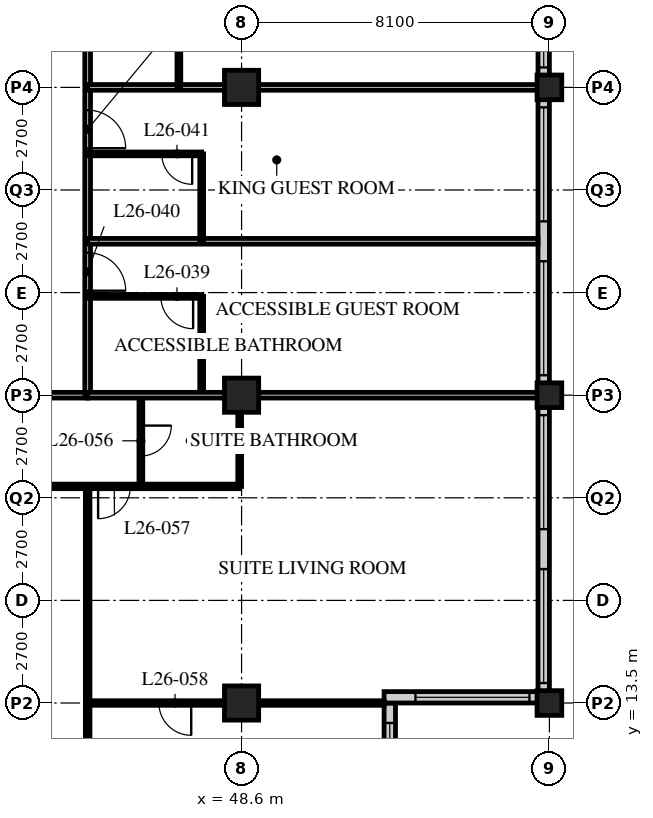
"""IFC4 building model, lengths in metres.
Left out: names, types, materials, properties, quantities, classifications, styles, units other than length and angle.
Written with IfcOpenShell. Run it as: python <this file> out.ifc"""

import sys

from ifc_helpers import new_model, si_unit, direction, frame, frame_2d, origin, origin_2d, place, context, subcontext, project, spatial, rectangle, hollow_rectangle, extrude, element, fill, save


model = new_model("IFC4")
c1 = context("Model", 3, precision=1e-05, world=origin(), true_north=direction((0.0, 1.0)))
c2 = subcontext(c1, "Body", "Model", "MODEL_VIEW")
j1 = project(units=[si_unit("LENGTHUNIT", "METRE"), si_unit("PLANEANGLEUNIT", "RADIAN")], contexts=[c1])
p1 = place(None, origin())
s1 = spatial("IfcSite", under=j1, at=p1, CompositionType="ELEMENT")
p2 = place(p1, origin())
s2 = spatial("IfcBuilding", under=s1, at=p2, CompositionType="ELEMENT")
p3 = place(p2, frame((0.0, 0.0, 106.8)))
s3 = spatial("IfcBuildingStorey", under=s2, at=p3, CompositionType="ELEMENT", Elevation=106.8)
for number, where, z_axis, x_axis in (
    (1, (48.6, 13.5, 0.0), (0.0, 0.0, 1.0), (1.0, 0.0, 0.0)),
    (2, (48.6, 21.6, 0.0), (0.0, 0.0, 1.0), (1.0, 0.0, 0.0)),
    (3, (48.6, 29.7, 0.0), (0.0, 0.0, 1.0), (1.0, 0.0, 0.0)),
):
    element("IfcColumn", number, at=place(p3, frame(where, z_axis=z_axis, x_axis=x_axis)), inside=s3, PredefinedType="COLUMN", context=c2, shape_type="SweptSolid", body=[
        extrude(hollow_rectangle(XDim=0.9, YDim=0.9, WallThickness=0.09, at=origin_2d()), origin(), (0.0, 0.0, 1.0), 3.4),
    ])
for number, where, z_axis, x_axis in (
    (4, (56.7, 13.5, 0.0), (0.0, 0.0, 1.0), (1.0, 0.0, 0.0)),
    (5, (56.7, 21.6, 0.0), (0.0, 0.0, 1.0), (1.0, 0.0, 0.0)),
    (6, (56.7, 29.7, 0.0), (0.0, 0.0, 1.0), (1.0, 0.0, 0.0)),
):
    element("IfcColumn", number, at=place(p3, frame(where, z_axis=z_axis, x_axis=x_axis)), inside=s3, PredefinedType="COLUMN", context=c2, shape_type="SweptSolid", body=[
        extrude(hollow_rectangle(XDim=0.65, YDim=0.65, WallThickness=0.055, at=origin_2d()), origin(), (0.0, 0.0, 1.0), 3.4),
    ])
p4 = place(p3, frame((52.5, 9.75, 0.0), z_axis=(0.0, 0.0, 1.0), x_axis=(0.0, 1.0, 0.0)))
e7 = element("IfcWall", 7, at=p4, inside=s3, PredefinedType="SOLIDWALL", context=c2, shape_type="SweptSolid", body=[
    extrude(rectangle(XDim=3.75, YDim=0.3, at=frame_2d((1.875, 0.0))), origin(), (0.0, 0.0, 1.0), 3.19),
])
p5 = place(p4, frame((0.225, 0.0, 0.9)))
e8 = element("IfcOpeningElement", 8, at=p5, cuts=e7, PredefinedType="OPENING", context=c2, shape_type="SweptSolid", body=[
    extrude(rectangle(XDim=3.0, YDim=1.5, at=frame_2d((1.5, 0.75))), frame((0.0, 0.16, 0.0), z_axis=(0.0, -1.0, 0.0), x_axis=(1.0, 0.0, 0.0)), (0.0, 0.0, 1.0), 0.32),
])
p6 = place(p3, frame((52.35, 13.65, 0.0), z_axis=(0.0, 0.0, 1.0), x_axis=(1.0, 0.0, 0.0)))
e9 = element("IfcWall", 9, at=p6, inside=s3, PredefinedType="SOLIDWALL", context=c2, shape_type="SweptSolid", body=[
    extrude(rectangle(XDim=4.35, YDim=0.3, at=frame_2d((2.175, 0.0))), origin(), (0.0, 0.0, 1.0), 3.19),
])
p7 = place(p6, frame((0.825, 0.0, 0.9)))
e10 = element("IfcOpeningElement", 10, at=p7, cuts=e9, PredefinedType="OPENING", context=c2, shape_type="SweptSolid", body=[
    extrude(rectangle(XDim=3.0, YDim=1.5, at=frame_2d((1.5, 0.75))), frame((0.0, 0.16, 0.0), z_axis=(0.0, -1.0, 0.0), x_axis=(1.0, 0.0, 0.0)), (0.0, 0.0, 1.0), 0.32),
])
p8 = place(p3, frame((56.55, 13.8, 0.0), z_axis=(0.0, 0.0, 1.0), x_axis=(0.0, 1.0, 0.0)))
e11 = element("IfcWall", 11, at=p8, inside=s3, PredefinedType="SOLIDWALL", context=c2, shape_type="SweptSolid", body=[
    extrude(rectangle(XDim=32.1, YDim=0.3, at=frame_2d((16.05, 0.0))), origin(), (0.0, 0.0, 1.0), 3.19),
])
p9 = place(p8, frame((0.225, 0.0, 0.9)))
e12 = element("IfcOpeningElement", 12, at=p9, cuts=e11, PredefinedType="OPENING", context=c2, shape_type="SweptSolid", body=[
    extrude(rectangle(XDim=3.0, YDim=2.0, at=frame_2d((1.5, 1.0))), frame((0.0, 0.16, 0.0), z_axis=(0.0, -1.0, 0.0), x_axis=(1.0, 0.0, 0.0)), (0.0, 0.0, 1.0), 0.32),
])
p10 = place(p8, frame((4.275, 0.0, 0.9)))
e13 = element("IfcOpeningElement", 13, at=p10, cuts=e11, PredefinedType="OPENING", context=c2, shape_type="SweptSolid", body=[
    extrude(rectangle(XDim=3.0, YDim=2.0, at=frame_2d((1.5, 1.0))), frame((0.0, 0.16, 0.0), z_axis=(0.0, -1.0, 0.0), x_axis=(1.0, 0.0, 0.0)), (0.0, 0.0, 1.0), 0.32),
])
p11 = place(p8, frame((8.325, 0.0, 0.9)))
e14 = element("IfcOpeningElement", 14, at=p11, cuts=e11, PredefinedType="OPENING", context=c2, shape_type="SweptSolid", body=[
    extrude(rectangle(XDim=3.0, YDim=2.0, at=frame_2d((1.5, 1.0))), frame((0.0, 0.16, 0.0), z_axis=(0.0, -1.0, 0.0), x_axis=(1.0, 0.0, 0.0)), (0.0, 0.0, 1.0), 0.32),
])
p12 = place(p8, frame((12.375, 0.0, 0.9)))
e15 = element("IfcOpeningElement", 15, at=p12, cuts=e11, PredefinedType="OPENING", context=c2, shape_type="SweptSolid", body=[
    extrude(rectangle(XDim=3.0, YDim=2.0, at=frame_2d((1.5, 1.0))), frame((0.0, 0.16, 0.0), z_axis=(0.0, -1.0, 0.0), x_axis=(1.0, 0.0, 0.0)), (0.0, 0.0, 1.0), 0.32),
])
p13 = place(p8, frame((16.425, 0.0, 0.9)))
e16 = element("IfcOpeningElement", 16, at=p13, cuts=e11, PredefinedType="OPENING", context=c2, shape_type="SweptSolid", body=[
    extrude(rectangle(XDim=3.0, YDim=2.0, at=frame_2d((1.5, 1.0))), frame((0.0, 0.16, 0.0), z_axis=(0.0, -1.0, 0.0), x_axis=(1.0, 0.0, 0.0)), (0.0, 0.0, 1.0), 0.32),
])
p14 = place(p8, frame((20.475, 0.0, 0.9)))
e17 = element("IfcOpeningElement", 17, at=p14, cuts=e11, PredefinedType="OPENING", context=c2, shape_type="SweptSolid", body=[
    extrude(rectangle(XDim=3.0, YDim=2.0, at=frame_2d((1.5, 1.0))), frame((0.0, 0.16, 0.0), z_axis=(0.0, -1.0, 0.0), x_axis=(1.0, 0.0, 0.0)), (0.0, 0.0, 1.0), 0.32),
])
p15 = place(p8, frame((24.525, 0.0, 0.9)))
e18 = element("IfcOpeningElement", 18, at=p15, cuts=e11, PredefinedType="OPENING", context=c2, shape_type="SweptSolid", body=[
    extrude(rectangle(XDim=3.0, YDim=2.0, at=frame_2d((1.5, 1.0))), frame((0.0, 0.16, 0.0), z_axis=(0.0, -1.0, 0.0), x_axis=(1.0, 0.0, 0.0)), (0.0, 0.0, 1.0), 0.32),
])
p16 = place(p8, frame((28.575, 0.0, 0.9)))
e19 = element("IfcOpeningElement", 19, at=p16, cuts=e11, PredefinedType="OPENING", context=c2, shape_type="SweptSolid", body=[
    extrude(rectangle(XDim=3.0, YDim=2.0, at=frame_2d((1.5, 1.0))), frame((0.0, 0.16, 0.0), z_axis=(0.0, -1.0, 0.0), x_axis=(1.0, 0.0, 0.0)), (0.0, 0.0, 1.0), 0.32),
])
p17 = place(p3, frame((12.15, 21.6, 0.0), z_axis=(0.0, 0.0, 1.0), x_axis=(1.0, 0.0, 0.0)))
e20 = element("IfcWall", 20, at=p17, inside=s3, PredefinedType="PARTITIONING", context=c2, shape_type="SweptSolid", body=[
    extrude(rectangle(XDim=32.4, YDim=0.15, at=frame_2d((16.2, 0.0))), origin(), (0.0, 0.0, 1.0), 2.578),
])
p18 = place(p17, frame((5.95, 0.0, 0.0)))
e21 = element("IfcOpeningElement", 21, at=p18, cuts=e20, PredefinedType="OPENING", context=c2, shape_type="SweptSolid", body=[
    extrude(rectangle(XDim=1.0, YDim=2.1, at=frame_2d((0.5, 1.05))), frame((0.0, 0.085, 0.0), z_axis=(0.0, -1.0, 0.0), x_axis=(1.0, 0.0, 0.0)), (0.0, 0.0, 1.0), 0.17),
])
p19 = place(p17, frame((14.05, 0.0, 0.0)))
e22 = element("IfcOpeningElement", 22, at=p19, cuts=e20, PredefinedType="OPENING", context=c2, shape_type="SweptSolid", body=[
    extrude(rectangle(XDim=1.0, YDim=2.1, at=frame_2d((0.5, 1.05))), frame((0.0, 0.085, 0.0), z_axis=(0.0, -1.0, 0.0), x_axis=(1.0, 0.0, 0.0)), (0.0, 0.0, 1.0), 0.17),
])
p20 = place(p17, frame((22.15, 0.0, 0.0)))
e23 = element("IfcOpeningElement", 23, at=p20, cuts=e20, PredefinedType="OPENING", context=c2, shape_type="SweptSolid", body=[
    extrude(rectangle(XDim=1.0, YDim=2.1, at=frame_2d((0.5, 1.05))), frame((0.0, 0.085, 0.0), z_axis=(0.0, -1.0, 0.0), x_axis=(1.0, 0.0, 0.0)), (0.0, 0.0, 1.0), 0.17),
])
p21 = place(p17, frame((1.525, 0.0, 0.0)))
e24 = element("IfcOpeningElement", 24, at=p21, cuts=e20, PredefinedType="OPENING", context=c2, shape_type="SweptSolid", body=[
    extrude(rectangle(XDim=1.0, YDim=2.1, at=frame_2d((0.5, 1.05))), frame((0.0, 0.085, 0.0), z_axis=(0.0, -1.0, 0.0), x_axis=(1.0, 0.0, 0.0)), (0.0, 0.0, 1.0), 0.17),
])
p22 = place(p17, frame((29.875, 0.0, 0.0)))
e25 = element("IfcOpeningElement", 25, at=p22, cuts=e20, PredefinedType="OPENING", context=c2, shape_type="SweptSolid", body=[
    extrude(rectangle(XDim=1.0, YDim=2.1, at=frame_2d((0.5, 1.05))), frame((0.0, 0.085, 0.0), z_axis=(0.0, -1.0, 0.0), x_axis=(1.0, 0.0, 0.0)), (0.0, 0.0, 1.0), 0.17),
])
p23 = place(p3, frame((44.55, 21.6, 0.0), z_axis=(0.0, 0.0, 1.0), x_axis=(0.0, 1.0, 0.0)))
e26 = element("IfcWall", 26, at=p23, inside=s3, PredefinedType="PARTITIONING", context=c2, shape_type="SweptSolid", body=[
    extrude(rectangle(XDim=24.3, YDim=0.15, at=frame_2d((12.15, 0.0))), origin(), (0.0, 0.0, 1.0), 3.19),
])
p24 = place(p23, frame((2.75, 0.0, 0.0)))
e27 = element("IfcOpeningElement", 27, at=p24, cuts=e26, PredefinedType="OPENING", context=c2, shape_type="SweptSolid", body=[
    extrude(rectangle(XDim=1.0, YDim=2.1, at=frame_2d((0.5, 1.05))), frame((0.0, 0.085, 0.0), z_axis=(0.0, -1.0, 0.0), x_axis=(1.0, 0.0, 0.0)), (0.0, 0.0, 1.0), 0.17),
])
p25 = place(p23, frame((6.5, 0.0, 0.0)))
e28 = element("IfcOpeningElement", 28, at=p25, cuts=e26, PredefinedType="OPENING", context=c2, shape_type="SweptSolid", body=[
    extrude(rectangle(XDim=1.0, YDim=2.1, at=frame_2d((0.5, 1.05))), frame((0.0, 0.085, 0.0), z_axis=(0.0, -1.0, 0.0), x_axis=(1.0, 0.0, 0.0)), (0.0, 0.0, 1.0), 0.17),
])
p26 = place(p23, frame((13.55, 0.0, 0.0)))
e29 = element("IfcOpeningElement", 29, at=p26, cuts=e26, PredefinedType="OPENING", context=c2, shape_type="SweptSolid", body=[
    extrude(rectangle(XDim=1.0, YDim=2.1, at=frame_2d((0.5, 1.05))), frame((0.0, 0.085, 0.0), z_axis=(0.0, -1.0, 0.0), x_axis=(1.0, 0.0, 0.0)), (0.0, 0.0, 1.0), 0.17),
])
p27 = place(p23, frame((21.65, 0.0, 0.0)))
e30 = element("IfcOpeningElement", 30, at=p27, cuts=e26, PredefinedType="OPENING", context=c2, shape_type="SweptSolid", body=[
    extrude(rectangle(XDim=1.0, YDim=2.1, at=frame_2d((0.5, 1.05))), frame((0.0, 0.085, 0.0), z_axis=(0.0, -1.0, 0.0), x_axis=(1.0, 0.0, 0.0)), (0.0, 0.0, 1.0), 0.17),
])
p28 = place(p3, frame((47.55, 21.6, 0.0), z_axis=(0.0, 0.0, 1.0), x_axis=(0.0, 1.0, 0.0)))
e31 = element("IfcWall", 31, at=p28, inside=s3, PredefinedType="PARTITIONING", context=c2, shape_type="SweptSolid", body=[
    extrude(rectangle(XDim=2.6, YDim=0.1, at=frame_2d((1.3, 0.0))), origin(), (0.0, 0.0, 1.0), 3.19),
])
p29 = place(p3, frame((44.55, 24.2, 0.0), z_axis=(0.0, 0.0, 1.0), x_axis=(1.0, 0.0, 0.0)))
e32 = element("IfcWall", 32, at=p29, inside=s3, PredefinedType="PARTITIONING", context=c2, shape_type="SweptSolid", body=[
    extrude(rectangle(XDim=3.0, YDim=0.1, at=frame_2d((1.5, 0.0))), origin(), (0.0, 0.0, 1.0), 3.19),
])
p30 = place(p29, frame((1.925, 0.0, 0.0)))
e33 = element("IfcOpeningElement", 33, at=p30, cuts=e32, PredefinedType="OPENING", context=c2, shape_type="SweptSolid", body=[
    extrude(rectangle(XDim=0.85, YDim=2.1, at=frame_2d((0.425, 1.05))), frame((0.0, 0.06, 0.0), z_axis=(0.0, -1.0, 0.0), x_axis=(1.0, 0.0, 0.0)), (0.0, 0.0, 1.0), 0.12),
])
p31 = place(p3, frame((44.55, 25.65, 0.0), z_axis=(0.0, 0.0, 1.0), x_axis=(1.0, 0.0, 0.0)))
e34 = element("IfcWall", 34, at=p31, inside=s3, PredefinedType="PARTITIONING", context=c2, shape_type="SweptSolid", body=[
    extrude(rectangle(XDim=11.85, YDim=0.15, at=frame_2d((5.925, 0.0))), origin(), (0.0, 0.0, 1.0), 3.19),
])
p32 = place(p3, frame((47.55, 25.65, 0.0), z_axis=(0.0, 0.0, 1.0), x_axis=(0.0, 1.0, 0.0)))
e35 = element("IfcWall", 35, at=p32, inside=s3, PredefinedType="PARTITIONING", context=c2, shape_type="SweptSolid", body=[
    extrude(rectangle(XDim=2.3, YDim=0.1, at=frame_2d((1.15, 0.0))), origin(), (0.0, 0.0, 1.0), 3.19),
])
p33 = place(p3, frame((44.55, 27.95, 0.0), z_axis=(0.0, 0.0, 1.0), x_axis=(1.0, 0.0, 0.0)))
e36 = element("IfcWall", 36, at=p33, inside=s3, PredefinedType="PARTITIONING", context=c2, shape_type="SweptSolid", body=[
    extrude(rectangle(XDim=3.0, YDim=0.1, at=frame_2d((1.5, 0.0))), origin(), (0.0, 0.0, 1.0), 3.19),
])
p34 = place(p33, frame((1.95, 0.0, 0.0)))
e37 = element("IfcOpeningElement", 37, at=p34, cuts=e36, PredefinedType="OPENING", context=c2, shape_type="SweptSolid", body=[
    extrude(rectangle(XDim=0.8, YDim=2.1, at=frame_2d((0.4, 1.05))), frame((0.0, 0.06, 0.0), z_axis=(0.0, -1.0, 0.0), x_axis=(1.0, 0.0, 0.0)), (0.0, 0.0, 1.0), 0.12),
])
p35 = place(p3, frame((44.55, 29.7, 0.0), z_axis=(0.0, 0.0, 1.0), x_axis=(1.0, 0.0, 0.0)))
e38 = element("IfcWall", 38, at=p35, inside=s3, PredefinedType="PARTITIONING", context=c2, shape_type="SweptSolid", body=[
    extrude(rectangle(XDim=11.85, YDim=0.15, at=frame_2d((5.925, 0.0))), origin(), (0.0, 0.0, 1.0), 2.578),
])
p36 = place(p3, frame((46.95, 29.7, 0.0), z_axis=(0.0, 0.0, 1.0), x_axis=(0.0, 1.0, 0.0)))
e39 = element("IfcWall", 39, at=p36, inside=s3, PredefinedType="PARTITIONING", context=c2, shape_type="SweptSolid", body=[
    extrude(rectangle(XDim=5.2, YDim=0.1, at=frame_2d((2.6, 0.0))), origin(), (0.0, 0.0, 1.0), 3.19),
])
p37 = place(p36, frame((1.3, 0.0, 0.0)))
e40 = element("IfcOpeningElement", 40, at=p37, cuts=e39, PredefinedType="OPENING", context=c2, shape_type="SweptSolid", body=[
    extrude(rectangle(XDim=0.8, YDim=2.1, at=frame_2d((0.4, 1.05))), frame((0.0, 0.06, 0.0), z_axis=(0.0, -1.0, 0.0), x_axis=(1.0, 0.0, 0.0)), (0.0, 0.0, 1.0), 0.12),
])
p38 = place(p36, frame((3.9, 0.0, 0.0)))
e41 = element("IfcOpeningElement", 41, at=p38, cuts=e39, PredefinedType="OPENING", context=c2, shape_type="SweptSolid", body=[
    extrude(rectangle(XDim=0.8, YDim=2.1, at=frame_2d((0.4, 1.05))), frame((0.0, 0.06, 0.0), z_axis=(0.0, -1.0, 0.0), x_axis=(1.0, 0.0, 0.0)), (0.0, 0.0, 1.0), 0.12),
])
p39 = place(p3, frame((40.5, 19.2, 0.0), z_axis=(0.0, 0.0, 1.0), x_axis=(1.0, 0.0, 0.0)))
e42 = element("IfcWall", 42, at=p39, inside=s3, PredefinedType="PARTITIONING", context=c2, shape_type="SweptSolid", body=[
    extrude(rectangle(XDim=8.05, YDim=0.12, at=frame_2d((4.025, 0.0))), origin(), (0.0, 0.0, 1.0), 3.19),
])
p40 = place(p39, frame((0.475, 0.0, 0.0)))
e43 = element("IfcOpeningElement", 43, at=p40, cuts=e42, PredefinedType="OPENING", context=c2, shape_type="SweptSolid", body=[
    extrude(rectangle(XDim=0.85, YDim=2.1, at=frame_2d((0.425, 1.05))), frame((0.0, 0.07, 0.0), z_axis=(0.0, -1.0, 0.0), x_axis=(1.0, 0.0, 0.0)), (0.0, 0.0, 1.0), 0.14),
])
p41 = place(p39, frame((4.325, 0.0, 0.0)))
e44 = element("IfcOpeningElement", 44, at=p41, cuts=e42, PredefinedType="OPENING", context=c2, shape_type="SweptSolid", body=[
    extrude(rectangle(XDim=0.85, YDim=2.1, at=frame_2d((0.425, 1.05))), frame((0.0, 0.07, 0.0), z_axis=(0.0, -1.0, 0.0), x_axis=(1.0, 0.0, 0.0)), (0.0, 0.0, 1.0), 0.14),
])
p42 = place(p3, frame((45.95, 21.6, 0.0), z_axis=(0.0, 0.0, 1.0), x_axis=(0.0, -1.0, 0.0)))
e45 = element("IfcWall", 45, at=p42, inside=s3, PredefinedType="PARTITIONING", context=c2, shape_type="SweptSolid", body=[
    extrude(rectangle(XDim=2.4, YDim=0.1, at=frame_2d((1.2, 0.0))), origin(), (0.0, 0.0, 1.0), 3.19),
])
p43 = place(p42, frame((0.8, 0.0, 0.0)))
e46 = element("IfcOpeningElement", 46, at=p43, cuts=e45, PredefinedType="OPENING", context=c2, shape_type="SweptSolid", body=[
    extrude(rectangle(XDim=0.8, YDim=2.1, at=frame_2d((0.4, 1.05))), frame((0.0, 0.06, 0.0), z_axis=(0.0, -1.0, 0.0), x_axis=(1.0, 0.0, 0.0)), (0.0, 0.0, 1.0), 0.12),
])
p44 = place(p3, frame((48.55, 21.6, 0.0), z_axis=(0.0, 0.0, 1.0), x_axis=(0.0, -1.0, 0.0)))
e47 = element("IfcWall", 47, at=p44, inside=s3, PredefinedType="PARTITIONING", context=c2, shape_type="SweptSolid", body=[
    extrude(rectangle(XDim=2.4, YDim=0.1, at=frame_2d((1.2, 0.0))), origin(), (0.0, 0.0, 1.0), 2.578),
])
p45 = place(p3, frame((44.55, 19.2, 0.0), z_axis=(0.0, 0.0, 1.0), x_axis=(0.0, -1.0, 0.0)))
e48 = element("IfcWall", 48, at=p45, inside=s3, PredefinedType="PARTITIONING", context=c2, shape_type="SweptSolid", body=[
    extrude(rectangle(XDim=13.5, YDim=0.12, at=frame_2d((6.75, 0.0))), origin(), (0.0, 0.0, 1.0), 3.19),
])
p46 = place(p3, frame((44.55, 13.5, 0.0), z_axis=(0.0, 0.0, 1.0), x_axis=(1.0, 0.0, 0.0)))
e49 = element("IfcWall", 49, at=p46, inside=s3, PredefinedType="PARTITIONING", context=c2, shape_type="SweptSolid", body=[
    extrude(rectangle(XDim=7.8, YDim=0.12, at=frame_2d((3.9, 0.0))), origin(), (0.0, 0.0, 1.0), 2.578),
])
p47 = place(p46, frame((1.875, 0.0, 0.0)))
e50 = element("IfcOpeningElement", 50, at=p47, cuts=e49, PredefinedType="OPENING", context=c2, shape_type="SweptSolid", body=[
    extrude(rectangle(XDim=0.85, YDim=2.1, at=frame_2d((0.425, 1.05))), frame((0.0, 0.07, 0.0), z_axis=(0.0, -1.0, 0.0), x_axis=(1.0, 0.0, 0.0)), (0.0, 0.0, 1.0), 0.14),
])
p48 = place(p3, frame((44.55, 21.6, 0.0), z_axis=(0.0, 0.0, 1.0), x_axis=(1.0, 0.0, 0.0)))
e51 = element("IfcWall", 51, at=p48, inside=s3, PredefinedType="PARTITIONING", context=c2, shape_type="SweptSolid", body=[
    extrude(rectangle(XDim=11.85, YDim=0.15, at=frame_2d((5.925, 0.0))), origin(), (0.0, 0.0, 1.0), 2.578),
])
p49 = place(p5, origin())
e52 = element("IfcWindow", 52, at=p49, inside=s3, PartitioningType="SINGLE_PANEL", PredefinedType="WINDOW", context=c2, shape_type="SweptSolid", body=[
    extrude(rectangle(XDim=3.0, YDim=1.5, at=frame_2d((1.5, 0.75))), frame((0.0, 0.03, 0.0), z_axis=(0.0, -1.0, 0.0), x_axis=(1.0, 0.0, 0.0)), (0.0, 0.0, 1.0), 0.06),
])
fill(e8, e52)
p50 = place(p7, origin())
e53 = element("IfcWindow", 53, at=p50, inside=s3, PartitioningType="SINGLE_PANEL", PredefinedType="WINDOW", context=c2, shape_type="SweptSolid", body=[
    extrude(rectangle(XDim=3.0, YDim=1.5, at=frame_2d((1.5, 0.75))), frame((0.0, 0.03, 0.0), z_axis=(0.0, -1.0, 0.0), x_axis=(1.0, 0.0, 0.0)), (0.0, 0.0, 1.0), 0.06),
])
fill(e10, e53)
p51 = place(p9, origin())
e54 = element("IfcWindow", 54, at=p51, inside=s3, PartitioningType="SINGLE_PANEL", PredefinedType="WINDOW", context=c2, shape_type="SweptSolid", body=[
    extrude(rectangle(XDim=3.0, YDim=2.0, at=frame_2d((1.5, 1.0))), frame((0.0, 0.03, 0.0), z_axis=(0.0, -1.0, 0.0), x_axis=(1.0, 0.0, 0.0)), (0.0, 0.0, 1.0), 0.06),
])
fill(e12, e54)
p52 = place(p10, origin())
e55 = element("IfcWindow", 55, at=p52, inside=s3, PartitioningType="SINGLE_PANEL", PredefinedType="WINDOW", context=c2, shape_type="SweptSolid", body=[
    extrude(rectangle(XDim=3.0, YDim=2.0, at=frame_2d((1.5, 1.0))), frame((0.0, 0.03, 0.0), z_axis=(0.0, -1.0, 0.0), x_axis=(1.0, 0.0, 0.0)), (0.0, 0.0, 1.0), 0.06),
])
fill(e13, e55)
p53 = place(p11, origin())
e56 = element("IfcWindow", 56, at=p53, inside=s3, PartitioningType="SINGLE_PANEL", PredefinedType="WINDOW", context=c2, shape_type="SweptSolid", body=[
    extrude(rectangle(XDim=3.0, YDim=2.0, at=frame_2d((1.5, 1.0))), frame((0.0, 0.03, 0.0), z_axis=(0.0, -1.0, 0.0), x_axis=(1.0, 0.0, 0.0)), (0.0, 0.0, 1.0), 0.06),
])
fill(e14, e56)
p54 = place(p12, origin())
e57 = element("IfcWindow", 57, at=p54, inside=s3, PartitioningType="SINGLE_PANEL", PredefinedType="WINDOW", context=c2, shape_type="SweptSolid", body=[
    extrude(rectangle(XDim=3.0, YDim=2.0, at=frame_2d((1.5, 1.0))), frame((0.0, 0.03, 0.0), z_axis=(0.0, -1.0, 0.0), x_axis=(1.0, 0.0, 0.0)), (0.0, 0.0, 1.0), 0.06),
])
fill(e15, e57)
p55 = place(p13, origin())
e58 = element("IfcWindow", 58, at=p55, inside=s3, PartitioningType="SINGLE_PANEL", PredefinedType="WINDOW", context=c2, shape_type="SweptSolid", body=[
    extrude(rectangle(XDim=3.0, YDim=2.0, at=frame_2d((1.5, 1.0))), frame((0.0, 0.03, 0.0), z_axis=(0.0, -1.0, 0.0), x_axis=(1.0, 0.0, 0.0)), (0.0, 0.0, 1.0), 0.06),
])
fill(e16, e58)
p56 = place(p30, origin())
e59 = element("IfcDoor", 59, at=p56, inside=s3, OperationType="SINGLE_SWING_LEFT", PredefinedType="DOOR", context=c2, shape_type="SweptSolid", body=[
    extrude(rectangle(XDim=0.85, YDim=2.1, at=frame_2d((0.425, 1.05))), frame((0.0, 0.025, 0.0), z_axis=(0.0, -1.0, 0.0), x_axis=(1.0, 0.0, 0.0)), (0.0, 0.0, 1.0), 0.05),
])
fill(e33, e59)
p57 = place(p24, origin())
e60 = element("IfcDoor", 60, at=p57, inside=s3, OperationType="SINGLE_SWING_RIGHT", PredefinedType="DOOR", context=c2, shape_type="SweptSolid", body=[
    extrude(rectangle(XDim=1.0, YDim=2.1, at=frame_2d((0.5, 1.05))), frame((0.0, 0.025, 0.0), z_axis=(0.0, -1.0, 0.0), x_axis=(1.0, 0.0, 0.0)), (0.0, 0.0, 1.0), 0.05),
])
fill(e27, e60)
p58 = place(p34, origin())
e61 = element("IfcDoor", 61, at=p58, inside=s3, OperationType="SINGLE_SWING_LEFT", PredefinedType="DOOR", context=c2, shape_type="SweptSolid", body=[
    extrude(rectangle(XDim=0.8, YDim=2.1, at=frame_2d((0.4, 1.05))), frame((0.0, 0.025, 0.0), z_axis=(0.0, -1.0, 0.0), x_axis=(1.0, 0.0, 0.0)), (0.0, 0.0, 1.0), 0.05),
])
fill(e37, e61)
p59 = place(p25, origin())
e62 = element("IfcDoor", 62, at=p59, inside=s3, OperationType="SINGLE_SWING_RIGHT", PredefinedType="DOOR", context=c2, shape_type="SweptSolid", body=[
    extrude(rectangle(XDim=1.0, YDim=2.1, at=frame_2d((0.5, 1.05))), frame((0.0, 0.025, 0.0), z_axis=(0.0, -1.0, 0.0), x_axis=(1.0, 0.0, 0.0)), (0.0, 0.0, 1.0), 0.05),
])
fill(e28, e62)
p60 = place(p43, origin())
e63 = element("IfcDoor", 63, at=p60, inside=s3, OperationType="SINGLE_SWING_LEFT", PredefinedType="DOOR", context=c2, shape_type="SweptSolid", body=[
    extrude(rectangle(XDim=0.8, YDim=2.1, at=frame_2d((0.4, 1.05))), frame((0.0, 0.025, 0.0), z_axis=(0.0, -1.0, 0.0), x_axis=(1.0, 0.0, 0.0)), (0.0, 0.0, 1.0), 0.05),
])
fill(e46, e63)
p61 = place(p41, origin())
e64 = element("IfcDoor", 64, at=p61, inside=s3, OperationType="SINGLE_SWING_RIGHT", PredefinedType="DOOR", context=c2, shape_type="SweptSolid", body=[
    extrude(rectangle(XDim=0.85, YDim=2.1, at=frame_2d((0.425, 1.05))), frame((0.0, 0.025, 0.0), z_axis=(0.0, -1.0, 0.0), x_axis=(1.0, 0.0, 0.0)), (0.0, 0.0, 1.0), 0.05),
])
fill(e44, e64)
p62 = place(p47, origin())
e65 = element("IfcDoor", 65, at=p62, inside=s3, OperationType="SINGLE_SWING_LEFT", PredefinedType="DOOR", context=c2, shape_type="SweptSolid", body=[
    extrude(rectangle(XDim=0.85, YDim=2.1, at=frame_2d((0.425, 1.05))), frame((0.0, 0.025, 0.0), z_axis=(0.0, -1.0, 0.0), x_axis=(1.0, 0.0, 0.0)), (0.0, 0.0, 1.0), 0.05),
])
fill(e50, e65)
save(model, sys.argv[1])
